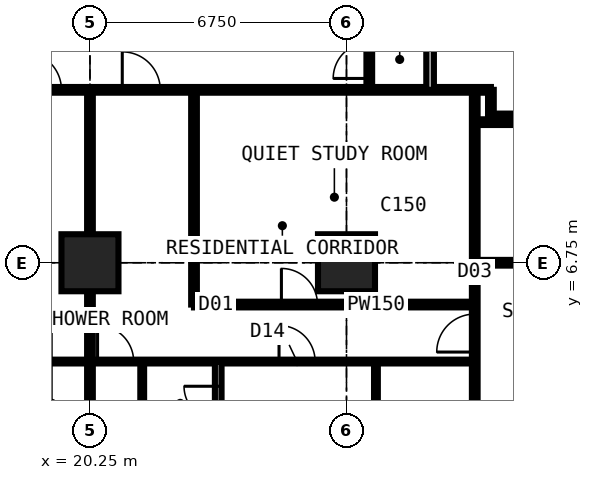
"""IFC4 building model, lengths in metres.
Left out: names, types, materials, properties, quantities, classifications, styles, units other than length and angle.
Written with IfcOpenShell. Run it as: python <this file> out.ifc"""

import sys

from ifc_helpers import new_model, si_unit, direction, frame, frame_2d, origin, origin_2d, place, context, subcontext, project, spatial, rectangle, extrude, element, fill, save


model = new_model("IFC4")
c1 = context("Model", 3, precision=1e-05, world=origin(), true_north=direction((0.0, 1.0)))
c2 = subcontext(c1, "Body", "Model", "MODEL_VIEW")
j1 = project(units=[si_unit("LENGTHUNIT", "METRE"), si_unit("PLANEANGLEUNIT", "RADIAN")], contexts=[c1])
p1 = place(None, origin())
s1 = spatial("IfcSite", under=j1, at=p1, CompositionType="ELEMENT")
p2 = place(p1, origin())
s2 = spatial("IfcBuilding", under=s1, at=p2, CompositionType="ELEMENT")
p3 = place(p2, frame((0.0, 0.0, 116.1)))
s3 = spatial("IfcBuildingStorey", under=s2, at=p3, CompositionType="ELEMENT", Elevation=116.1)
for number, where, z_axis, x_axis in (
    (1, (20.25, 6.75, 0.0), (0.0, 0.0, 1.0), (1.0, 0.0, 0.0)),
    (2, (27.0, 6.75, 0.0), (0.0, 0.0, 1.0), (1.0, 0.0, 0.0)),
):
    element("IfcColumn", number, at=place(p3, frame(where, z_axis=z_axis, x_axis=x_axis)), inside=s3, PredefinedType="COLUMN", context=c2, shape_type="SweptSolid", body=[
        extrude(rectangle(XDim=1.5, YDim=1.5, at=origin_2d()), origin(), (0.0, 0.0, 1.0), 3.6),
    ])
p4 = place(p3, frame((6.75, 4.15, 0.0), z_axis=(0.0, 0.0, 1.0), x_axis=(1.0, 0.0, 0.0)))
e3 = element("IfcWall", 3, at=p4, inside=s3, PredefinedType="PARTITIONING", context=c2, shape_type="SweptSolid", body=[
    extrude(rectangle(XDim=23.625, YDim=0.1, at=frame_2d((11.812, 0.0))), origin(), (0.0, 0.0, 1.0), 3.375),
])
p5 = place(p4, frame((0.2, 0.0, 0.0)))
e4 = element("IfcOpeningElement", 4, at=p5, cuts=e3, PredefinedType="OPENING", context=c2, shape_type="SweptSolid", body=[
    extrude(rectangle(XDim=0.95, YDim=2.2, at=frame_2d((0.475, 1.1))), frame((0.0, 0.06, 0.0), z_axis=(0.0, -1.0, 0.0), x_axis=(1.0, 0.0, 0.0)), (0.0, 0.0, 1.0), 0.12),
])
p6 = place(p4, frame((3.625, 0.0, 0.0)))
e5 = element("IfcOpeningElement", 5, at=p6, cuts=e3, PredefinedType="OPENING", context=c2, shape_type="SweptSolid", body=[
    extrude(rectangle(XDim=0.95, YDim=2.2, at=frame_2d((0.475, 1.1))), frame((0.0, 0.06, 0.0), z_axis=(0.0, -1.0, 0.0), x_axis=(1.0, 0.0, 0.0)), (0.0, 0.0, 1.0), 0.12),
])
p7 = place(p4, frame((7.0, 0.0, 0.0)))
e6 = element("IfcOpeningElement", 6, at=p7, cuts=e3, PredefinedType="OPENING", context=c2, shape_type="SweptSolid", body=[
    extrude(rectangle(XDim=0.95, YDim=2.2, at=frame_2d((0.475, 1.1))), frame((0.0, 0.06, 0.0), z_axis=(0.0, -1.0, 0.0), x_axis=(1.0, 0.0, 0.0)), (0.0, 0.0, 1.0), 0.12),
])
p8 = place(p4, frame((10.375, 0.0, 0.0)))
e7 = element("IfcOpeningElement", 7, at=p8, cuts=e3, PredefinedType="OPENING", context=c2, shape_type="SweptSolid", body=[
    extrude(rectangle(XDim=0.95, YDim=2.2, at=frame_2d((0.475, 1.1))), frame((0.0, 0.06, 0.0), z_axis=(0.0, -1.0, 0.0), x_axis=(1.0, 0.0, 0.0)), (0.0, 0.0, 1.0), 0.12),
])
p9 = place(p4, frame((18.475, 0.0, 0.0)))
e8 = element("IfcOpeningElement", 8, at=p9, cuts=e3, PredefinedType="OPENING", context=c2, shape_type="SweptSolid", body=[
    extrude(rectangle(XDim=0.95, YDim=2.2, at=frame_2d((0.475, 1.1))), frame((0.0, 0.06, 0.0), z_axis=(0.0, -1.0, 0.0), x_axis=(1.0, 0.0, 0.0)), (0.0, 0.0, 1.0), 0.12),
])
p10 = place(p4, frame((13.7, 0.0, 0.0)))
e9 = element("IfcOpeningElement", 9, at=p10, cuts=e3, PredefinedType="OPENING", context=c2, shape_type="SweptSolid", body=[
    extrude(rectangle(XDim=0.95, YDim=2.2, at=frame_2d((0.475, 1.1))), frame((0.0, 0.06, 0.0), z_axis=(0.0, -1.0, 0.0), x_axis=(1.0, 0.0, 0.0)), (0.0, 0.0, 1.0), 0.12),
])
p11 = place(p3, frame((10.125, 11.3, 0.0), z_axis=(0.0, 0.0, 1.0), x_axis=(1.0, 0.0, 0.0)))
e10 = element("IfcWall", 10, at=p11, inside=s3, PredefinedType="PARTITIONING", context=c2, shape_type="SweptSolid", body=[
    extrude(rectangle(XDim=20.675, YDim=0.15, at=frame_2d((10.337, 0.0))), origin(), (0.0, 0.0, 1.0), 3.375),
])
p12 = place(p11, frame((8.375, 0.0, 0.0)))
e11 = element("IfcOpeningElement", 11, at=p12, cuts=e10, PredefinedType="OPENING", context=c2, shape_type="SweptSolid", body=[
    extrude(rectangle(XDim=1.0, YDim=2.2, at=frame_2d((0.5, 1.1))), frame((0.0, 0.085, 0.0), z_axis=(0.0, -1.0, 0.0), x_axis=(1.0, 0.0, 0.0)), (0.0, 0.0, 1.0), 0.17),
])
p13 = place(p11, frame((10.975, 0.0, 0.0)))
e12 = element("IfcOpeningElement", 12, at=p13, cuts=e10, PredefinedType="OPENING", context=c2, shape_type="SweptSolid", body=[
    extrude(rectangle(XDim=1.0, YDim=2.2, at=frame_2d((0.5, 1.1))), frame((0.0, 0.085, 0.0), z_axis=(0.0, -1.0, 0.0), x_axis=(1.0, 0.0, 0.0)), (0.0, 0.0, 1.0), 0.17),
])
p14 = place(p11, frame((3.925, 0.0, 0.0)))
e13 = element("IfcOpeningElement", 13, at=p14, cuts=e10, PredefinedType="OPENING", context=c2, shape_type="SweptSolid", body=[
    extrude(rectangle(XDim=0.95, YDim=2.2, at=frame_2d((0.475, 1.1))), frame((0.0, 0.085, 0.0), z_axis=(0.0, -1.0, 0.0), x_axis=(1.0, 0.0, 0.0)), (0.0, 0.0, 1.0), 0.17),
])
p15 = place(p3, frame((20.25, -0.734, 0.0), z_axis=(0.0, 0.0, 1.0), x_axis=(0.0, 1.0, 0.0)))
e14 = element("IfcWall", 14, at=p15, inside=s3, PredefinedType="PARTITIONING", context=c2, shape_type="SweptSolid", body=[
    extrude(rectangle(XDim=12.034, YDim=0.15, at=frame_2d((6.017, 0.0))), origin(), (0.0, 0.0, 1.0), 2.61),
])
p16 = place(p3, frame((21.625, 1.95, 0.0), z_axis=(0.0, 0.0, 1.0), x_axis=(0.0, 1.0, 0.0)))
e15 = element("IfcWall", 15, at=p16, inside=s3, PredefinedType="PARTITIONING", context=c2, shape_type="SweptSolid", body=[
    extrude(rectangle(XDim=2.2, YDim=0.1, at=frame_2d((1.1, 0.0))), origin(), (0.0, 0.0, 1.0), 3.375),
])
p17 = place(p3, frame((22.988, 5.65, 0.0), z_axis=(0.0, 0.0, 1.0), x_axis=(1.0, 0.0, 0.0)))
e16 = element("IfcWall", 16, at=p17, inside=s3, PredefinedType="PARTITIONING", context=c2, shape_type="SweptSolid", body=[
    extrude(rectangle(XDim=7.387, YDim=0.15, at=frame_2d((3.694, 0.0))), origin(), (0.0, 0.0, 1.0), 3.375),
])
p18 = place(p17, frame((2.3, 0.0, 0.0)))
e17 = element("IfcOpeningElement", 17, at=p18, cuts=e16, PredefinedType="OPENING", context=c2, shape_type="SweptSolid", body=[
    extrude(rectangle(XDim=0.95, YDim=2.2, at=frame_2d((0.475, 1.1))), frame((0.0, 0.085, 0.0), z_axis=(0.0, -1.0, 0.0), x_axis=(1.0, 0.0, 0.0)), (0.0, 0.0, 1.0), 0.17),
])
p19 = place(p3, frame((22.988, 5.65, 0.0), z_axis=(0.0, 0.0, 1.0), x_axis=(0.0, 1.0, 0.0)))
e18 = element("IfcWall", 18, at=p19, inside=s3, PredefinedType="PARTITIONING", context=c2, shape_type="SweptSolid", body=[
    extrude(rectangle(XDim=5.65, YDim=0.15, at=frame_2d((2.825, 0.0))), origin(), (0.0, 0.0, 1.0), 3.375),
])
p20 = place(p3, frame((23.625, -0.734, 0.0), z_axis=(0.0, 0.0, 1.0), x_axis=(0.0, 1.0, 0.0)))
e19 = element("IfcWall", 19, at=p20, inside=s3, PredefinedType="PARTITIONING", context=c2, shape_type="SweptSolid", body=[
    extrude(rectangle(XDim=4.884, YDim=0.175, at=frame_2d((2.442, 0.0))), origin(), (0.0, 0.0, 1.0), 3.375),
])
p21 = place(p20, frame((3.334, 0.0, 0.0)))
e20 = element("IfcOpeningElement", 20, at=p21, cuts=e19, PredefinedType="OPENING", context=c2, shape_type="SweptSolid", body=[
    extrude(rectangle(XDim=0.9, YDim=2.2, at=frame_2d((0.45, 1.1))), frame((0.0, 0.097, 0.0), z_axis=(0.0, -1.0, 0.0), x_axis=(1.0, 0.0, 0.0)), (0.0, 0.0, 1.0), 0.195),
])
p22 = place(p3, frame((27.6, 11.3, 0.0), z_axis=(0.0, 0.0, 1.0), x_axis=(0.0, 1.0, 0.0)))
e21 = element("IfcWall", 21, at=p22, inside=s3, PredefinedType="PARTITIONING", context=c2, shape_type="SweptSolid", body=[
    extrude(rectangle(XDim=1.6, YDim=0.15, at=frame_2d((0.8, 0.0))), origin(), (0.0, 0.0, 1.0), 3.375),
])
p23 = place(p22, frame((0.3, 0.0, 0.0)))
e22 = element("IfcOpeningElement", 22, at=p23, cuts=e21, PredefinedType="OPENING", context=c2, shape_type="SweptSolid", body=[
    extrude(rectangle(XDim=0.95, YDim=2.2, at=frame_2d((0.475, 1.1))), frame((0.0, 0.085, 0.0), z_axis=(0.0, -1.0, 0.0), x_axis=(1.0, 0.0, 0.0)), (0.0, 0.0, 1.0), 0.17),
])
p24 = place(p3, frame((27.775, 1.75, 0.0), z_axis=(0.0, 0.0, 1.0), x_axis=(0.0, 1.0, 0.0)))
e23 = element("IfcWall", 23, at=p24, inside=s3, PredefinedType="PARTITIONING", context=c2, shape_type="SweptSolid", body=[
    extrude(rectangle(XDim=2.4, YDim=0.1, at=frame_2d((1.2, 0.0))), origin(), (0.0, 0.0, 1.0), 3.375),
])
p25 = place(p3, frame((29.2, 11.3, 0.0), z_axis=(0.0, 0.0, 1.0), x_axis=(0.0, 1.0, 0.0)))
e24 = element("IfcWall", 24, at=p25, inside=s3, PredefinedType="PARTITIONING", context=c2, shape_type="SweptSolid", body=[
    extrude(rectangle(XDim=17.9, YDim=0.2, at=frame_2d((8.95, 0.0))), origin(), (0.0, 0.0, 1.0), 3.375),
])
p26 = place(p25, frame((8.35, 0.0, 0.0)))
e25 = element("IfcOpeningElement", 25, at=p26, cuts=e24, PredefinedType="OPENING", context=c2, shape_type="SweptSolid", body=[
    extrude(rectangle(XDim=1.2, YDim=2.2, at=frame_2d((0.6, 1.1))), frame((0.0, 0.11, 0.0), z_axis=(0.0, -1.0, 0.0), x_axis=(1.0, 0.0, 0.0)), (0.0, 0.0, 1.0), 0.22),
])
p27 = place(p3, frame((30.375, -0.734, 0.0), z_axis=(0.0, 0.0, 1.0), x_axis=(0.0, 1.0, 0.0)))
e26 = element("IfcWall", 26, at=p27, inside=s3, PredefinedType="PARTITIONING", context=c2, shape_type="SweptSolid", body=[
    extrude(rectangle(XDim=12.034, YDim=0.15, at=frame_2d((6.017, 0.0))), origin(), (0.0, 0.0, 1.0), 3.375),
])
p28 = place(p27, frame((5.134, 0.0, 0.0)))
e27 = element("IfcOpeningElement", 27, at=p28, cuts=e26, PredefinedType="OPENING", context=c2, shape_type="SweptSolid", body=[
    extrude(rectangle(XDim=1.0, YDim=2.2, at=frame_2d((0.5, 1.1))), frame((0.0, 0.085, 0.0), z_axis=(0.0, -1.0, 0.0), x_axis=(1.0, 0.0, 0.0)), (0.0, 0.0, 1.0), 0.17),
])
p29 = place(p3, frame((30.375, 6.75, 0.0), z_axis=(0.0, 0.0, 1.0), x_axis=(1.0, 0.0, 0.0)))
e28 = element("IfcWall", 28, at=p29, inside=s3, PredefinedType="PARTITIONING", context=c2, shape_type="SweptSolid", body=[
    extrude(rectangle(XDim=5.975, YDim=0.15, at=frame_2d((2.988, 0.0))), origin(), (0.0, 0.0, 1.0), 2.877),
])
p30 = place(p3, frame((30.375, 10.45, 0.0), z_axis=(0.0, 0.0, 1.0), x_axis=(1.0, 0.0, 0.0)))
e29 = element("IfcWall", 29, at=p30, inside=s3, PredefinedType="PARTITIONING", context=c2, shape_type="SweptSolid", body=[
    extrude(rectangle(XDim=4.475, YDim=0.15, at=frame_2d((2.238, 0.0))), origin(), (0.0, 0.0, 1.0), 3.375),
])
p31 = place(p30, frame((2.35, 0.0, 0.0)))
e30 = element("IfcOpeningElement", 30, at=p31, cuts=e29, PredefinedType="OPENING", context=c2, shape_type="SweptSolid", body=[
    extrude(rectangle(XDim=0.95, YDim=2.2, at=frame_2d((0.475, 1.1))), frame((0.0, 0.085, 0.0), z_axis=(0.0, -1.0, 0.0), x_axis=(1.0, 0.0, 0.0)), (0.0, 0.0, 1.0), 0.17),
])
p32 = place(p3, frame((30.8, 10.6, 0.0), z_axis=(0.0, 0.0, 1.0), x_axis=(0.0, 1.0, 0.0)))
e31 = element("IfcWall", 31, at=p32, inside=s3, PredefinedType="PARTITIONING", context=c2, shape_type="SweptSolid", body=[
    extrude(rectangle(XDim=0.7, YDim=0.15, at=frame_2d((0.35, 0.0))), origin(), (0.0, 0.0, 1.0), 3.375),
])
p33 = place(p3, frame((30.8, 10.6, 0.0), z_axis=(0.0, 0.0, 1.0), x_axis=(1.0, 0.0, 0.0)))
e32 = element("IfcWall", 32, at=p33, inside=s3, PredefinedType="PARTITIONING", context=c2, shape_type="SweptSolid", body=[
    extrude(rectangle(XDim=1.85, YDim=0.15, at=frame_2d((0.925, 0.0))), origin(), (0.0, 0.0, 1.0), 3.375),
])
p34 = place(p23, origin())
e33 = element("IfcDoor", 33, at=p34, inside=s3, OperationType="SINGLE_SWING_LEFT", PredefinedType="DOOR", context=c2, shape_type="SweptSolid", body=[
    extrude(rectangle(XDim=0.95, YDim=2.2, at=frame_2d((0.475, 1.1))), frame((0.0, 0.025, 0.0), z_axis=(0.0, -1.0, 0.0), x_axis=(1.0, 0.0, 0.0)), (0.0, 0.0, 1.0), 0.05),
])
fill(e22, e33)
p35 = place(p12, origin())
e34 = element("IfcDoor", 34, at=p35, inside=s3, OperationType="SINGLE_SWING_LEFT", PredefinedType="DOOR", context=c2, shape_type="SweptSolid", body=[
    extrude(rectangle(XDim=1.0, YDim=2.2, at=frame_2d((0.5, 1.1))), frame((0.0, 0.025, 0.0), z_axis=(0.0, -1.0, 0.0), x_axis=(1.0, 0.0, 0.0)), (0.0, 0.0, 1.0), 0.05),
])
fill(e11, e34)
p36 = place(p9, origin())
e35 = element("IfcDoor", 35, at=p36, inside=s3, OperationType="SINGLE_SWING_LEFT", PredefinedType="DOOR", context=c2, shape_type="SweptSolid", body=[
    extrude(rectangle(XDim=0.95, YDim=2.2, at=frame_2d((0.475, 1.1))), frame((0.0, 0.025, 0.0), z_axis=(0.0, -1.0, 0.0), x_axis=(1.0, 0.0, 0.0)), (0.0, 0.0, 1.0), 0.05),
])
fill(e8, e35)
p37 = place(p10, origin())
e36 = element("IfcDoor", 36, at=p37, inside=s3, OperationType="SINGLE_SWING_LEFT", PredefinedType="DOOR", context=c2, shape_type="SweptSolid", body=[
    extrude(rectangle(XDim=0.95, YDim=2.2, at=frame_2d((0.475, 1.1))), frame((0.0, 0.025, 0.0), z_axis=(0.0, -1.0, 0.0), x_axis=(1.0, 0.0, 0.0)), (0.0, 0.0, 1.0), 0.05),
])
fill(e9, e36)
p38 = place(p21, origin())
e37 = element("IfcDoor", 37, at=p38, inside=s3, OperationType="SINGLE_SWING_RIGHT", PredefinedType="DOOR", context=c2, shape_type="SweptSolid", body=[
    extrude(rectangle(XDim=0.9, YDim=2.2, at=frame_2d((0.45, 1.1))), frame((0.0, 0.025, 0.0), z_axis=(0.0, -1.0, 0.0), x_axis=(1.0, 0.0, 0.0)), (0.0, 0.0, 1.0), 0.05),
])
fill(e20, e37)
p39 = place(p13, origin())
e38 = element("IfcDoor", 38, at=p39, inside=s3, OperationType="SINGLE_SWING_LEFT", PredefinedType="DOOR", context=c2, shape_type="SweptSolid", body=[
    extrude(rectangle(XDim=1.0, YDim=2.2, at=frame_2d((0.5, 1.1))), frame((0.0, 0.025, 0.0), z_axis=(0.0, -1.0, 0.0), x_axis=(1.0, 0.0, 0.0)), (0.0, 0.0, 1.0), 0.05),
])
fill(e12, e38)
p40 = place(p18, origin())
e39 = element("IfcDoor", 39, at=p40, inside=s3, OperationType="SINGLE_SWING_LEFT", PredefinedType="DOOR", context=c2, shape_type="SweptSolid", body=[
    extrude(rectangle(XDim=0.95, YDim=2.2, at=frame_2d((0.475, 1.1))), frame((0.0, 0.025, 0.0), z_axis=(0.0, -1.0, 0.0), x_axis=(1.0, 0.0, 0.0)), (0.0, 0.0, 1.0), 0.05),
])
fill(e17, e39)
p41 = place(p28, origin())
e40 = element("IfcDoor", 40, at=p41, inside=s3, OperationType="SINGLE_SWING_LEFT", PredefinedType="DOOR", context=c2, shape_type="SweptSolid", body=[
    extrude(rectangle(XDim=1.0, YDim=2.2, at=frame_2d((0.5, 1.1))), frame((0.0, 0.025, 0.0), z_axis=(0.0, -1.0, 0.0), x_axis=(1.0, 0.0, 0.0)), (0.0, 0.0, 1.0), 0.05),
])
fill(e27, e40)
save(model, sys.argv[1])
